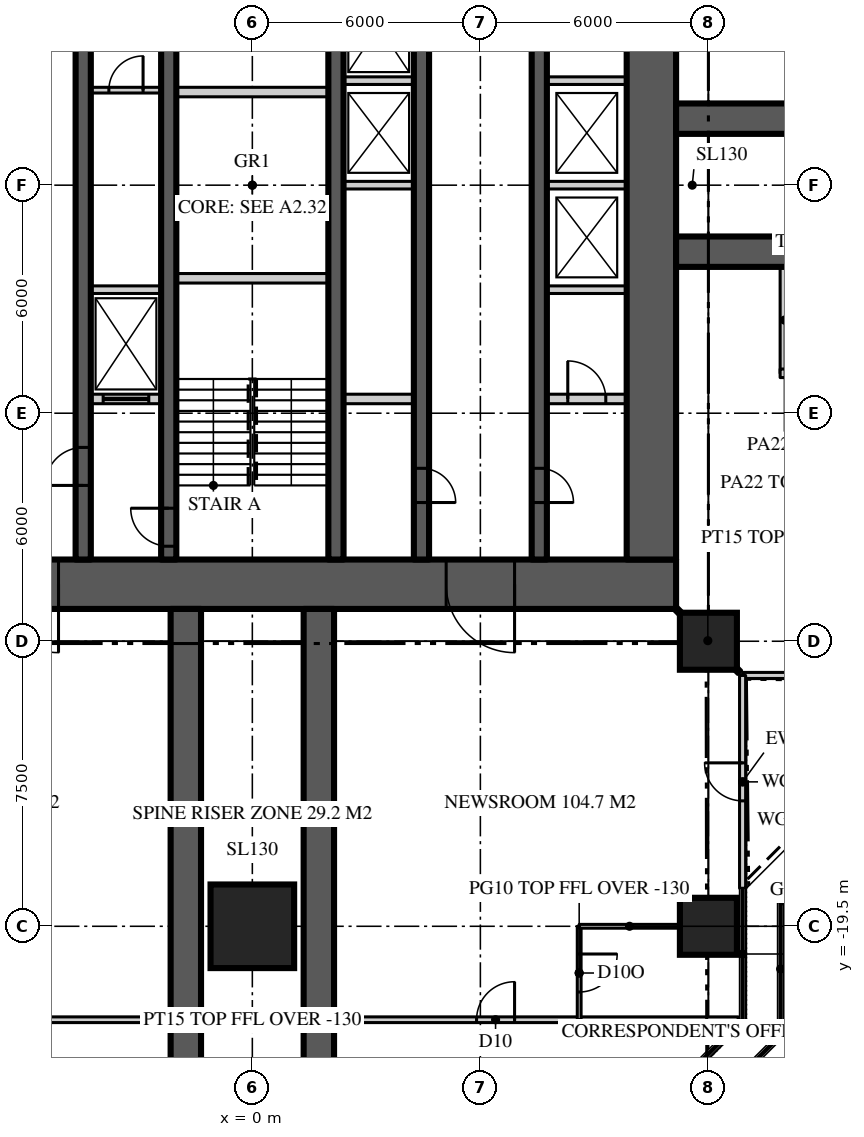
"""IFC4 building model, lengths in metres.
Left out: names, types, materials, properties, quantities, classifications, styles, units other than length and angle.
Written with IfcOpenShell. Run it as: python <this file> out.ifc"""

import sys

from ifc_helpers import new_model, si_unit, direction, frame, frame_2d, origin, origin_2d, place, context, subcontext, project, spatial, rectangle, extrude, element, fill, save


model = new_model("IFC4")
c1 = context("Model", 3, precision=1e-05, world=origin(), true_north=direction((0.0, 1.0)))
c2 = subcontext(c1, "Body", "Model", "MODEL_VIEW")
j1 = project(units=[si_unit("LENGTHUNIT", "METRE"), si_unit("PLANEANGLEUNIT", "RADIAN")], contexts=[c1])
p1 = place(None, origin())
s1 = spatial("IfcSite", under=j1, at=p1, CompositionType="ELEMENT")
p2 = place(p1, origin())
s2 = spatial("IfcBuilding", under=s1, at=p2, CompositionType="ELEMENT")
p3 = place(p2, frame((0.0, 0.0, 243.9)))
s3 = spatial("IfcBuildingStorey", under=s2, at=p3, CompositionType="ELEMENT", Elevation=243.9)
p4 = place(p3, frame((11.15, -10.5, 0.0), z_axis=(0.0, 0.0, 1.0), x_axis=(-1.0, 0.0, 0.0)))
e1 = element("IfcWall", 1, at=p4, inside=s3, PredefinedType="SHEAR", context=c2, shape_type="SweptSolid", body=[
    extrude(rectangle(XDim=22.3, YDim=1.3, at=frame_2d((11.15, 0.0))), origin(), (0.0, 0.0, 1.0), 3.9),
])
p5 = place(p4, frame((16.25, 0.0, 0.0)))
e2 = element("IfcOpeningElement", 2, at=p5, cuts=e1, PredefinedType="OPENING", context=c2, shape_type="SweptSolid", body=[
    extrude(rectangle(XDim=1.8, YDim=2.2, at=frame_2d((0.9, 1.1))), frame((0.0, 0.66, 0.0), z_axis=(0.0, -1.0, 0.0), x_axis=(1.0, 0.0, 0.0)), (0.0, 0.0, 1.0), 1.32),
])
p6 = place(p4, frame((4.25, 0.0, 0.0)))
e3 = element("IfcOpeningElement", 3, at=p6, cuts=e1, PredefinedType="OPENING", context=c2, shape_type="SweptSolid", body=[
    extrude(rectangle(XDim=1.8, YDim=2.2, at=frame_2d((0.9, 1.1))), frame((0.0, 0.66, 0.0), z_axis=(0.0, -1.0, 0.0), x_axis=(1.0, 0.0, 0.0)), (0.0, 0.0, 1.0), 1.32),
])
p7 = place(p3, frame((10.5, -9.85, 0.0), z_axis=(0.0, 0.0, 1.0), x_axis=(0.0, 1.0, 0.0)))
e4 = element("IfcWall", 4, at=p7, inside=s3, PredefinedType="SHEAR", context=c2, shape_type="SweptSolid", body=[
    extrude(rectangle(XDim=19.7, YDim=1.3, at=frame_2d((9.85, 0.0))), origin(), (0.0, 0.0, 1.0), 3.9),
])
p8 = place(p7, frame((17.25, 0.0, 0.0)))
e5 = element("IfcOpeningElement", 5, at=p8, cuts=e4, PredefinedType="OPENING", context=c2, shape_type="SweptSolid", body=[
    extrude(rectangle(XDim=1.0, YDim=2.2, at=frame_2d((0.5, 1.1))), frame((0.0, 0.66, 0.0), z_axis=(0.0, -1.0, 0.0), x_axis=(1.0, 0.0, 0.0)), (0.0, 0.0, 1.0), 1.32),
])
for number, where, z_axis, x_axis in (
    (6, (11.15, -1.75, 0.0), (0.0, 0.0, 1.0), (1.0, 0.0, 0.0)),
    (7, (11.15, 1.75, 0.0), (0.0, 0.0, 1.0), (1.0, 0.0, 0.0)),
    (8, (-1.75, -11.15, 0.0), (0.0, 0.0, 1.0), (0.0, -1.0, 0.0)),
    (9, (1.75, -11.15, 0.0), (0.0, 0.0, 1.0), (0.0, -1.0, 0.0)),
):
    element("IfcWall", number, at=place(p3, frame(where, z_axis=z_axis, x_axis=x_axis)), inside=s3, PredefinedType="SHEAR", context=c2, shape_type="SweptSolid", body=[
        extrude(rectangle(XDim=15.25, YDim=0.8, at=frame_2d((7.625, 0.0))), origin(), (0.0, 0.0, 1.0), 3.9),
    ])
p9 = place(p3, frame((0.0, -19.5, 0.0), z_axis=(0.0, 0.0, 1.0), x_axis=(1.0, 0.0, 0.0)))
e10 = element("IfcColumn", 10, at=p9, inside=s3, PredefinedType="COLUMN", context=c2, shape_type="SweptSolid", body=[
    extrude(rectangle(XDim=2.2, YDim=2.2, at=origin_2d()), origin(), (0.0, 0.0, 1.0), 3.9),
])
for number, where, z_axis, x_axis in (
    (11, (12.0, -19.5, 0.0), (0.0, 0.0, 1.0), (1.0, 0.0, 0.0)),
    (12, (12.0, -12.0, 0.0), (0.0, 0.0, 1.0), (1.0, 0.0, 0.0)),
):
    element("IfcColumn", number, at=place(p3, frame(where, z_axis=z_axis, x_axis=x_axis)), inside=s3, PredefinedType="COLUMN", context=c2, shape_type="SweptSolid", body=[
        extrude(rectangle(XDim=1.5, YDim=1.5, at=origin_2d()), origin(), (0.0, 0.0, 1.0), 3.9),
    ])
p10 = place(p3, frame((12.9, -12.9, 0.0), z_axis=(0.0, 0.0, 1.0), x_axis=(1.0, 0.0, 0.0)))
e13 = element("IfcWall", 13, at=p10, inside=s3, PredefinedType="SOLIDWALL", context=c2, shape_type="SweptSolid", body=[
    extrude(rectangle(XDim=5.6, YDim=0.16, at=frame_2d((2.8, 0.0))), origin(), (0.0, 0.0, 1.0), 3.77),
])
p11 = place(p3, frame((12.9, -18.5, 0.0), z_axis=(0.0, 0.0, 1.0), x_axis=(0.0, 1.0, 0.0)))
e14 = element("IfcWall", 14, at=p11, inside=s3, PredefinedType="SOLIDWALL", context=c2, shape_type="SweptSolid", body=[
    extrude(rectangle(XDim=5.6, YDim=0.16, at=frame_2d((2.8, 0.0))), origin(), (0.0, 0.0, 1.0), 3.77),
])
p12 = place(p11, frame((2.3, 0.0, 0.0)))
e15 = element("IfcOpeningElement", 15, at=p12, cuts=e14, PredefinedType="OPENING", context=c2, shape_type="SweptSolid", body=[
    extrude(rectangle(XDim=1.0, YDim=2.2, at=frame_2d((0.5, 1.1))), frame((0.0, 0.09, 0.0), z_axis=(0.0, -1.0, 0.0), x_axis=(1.0, 0.0, 0.0)), (0.0, 0.0, 1.0), 0.18),
])
p13 = place(p3, frame((7.55, 9.85, 0.0), z_axis=(0.0, 0.0, 1.0), x_axis=(0.0, -1.0, 0.0)))
e16 = element("IfcWall", 16, at=p13, inside=s3, PredefinedType="SHEAR", context=c2, shape_type="SweptSolid", body=[
    extrude(rectangle(XDim=19.7, YDim=0.4, at=frame_2d((9.85, 0.0))), origin(), (0.0, 0.0, 1.0), 3.9),
])
p14 = place(p13, frame((1.45, 0.0, 0.0)))
e17 = element("IfcOpeningElement", 17, at=p14, cuts=e16, PredefinedType="OPENING", context=c2, shape_type="SweptSolid", body=[
    extrude(rectangle(XDim=1.0, YDim=2.2, at=frame_2d((0.5, 1.1))), frame((0.0, 0.21, 0.0), z_axis=(0.0, -1.0, 0.0), x_axis=(1.0, 0.0, 0.0)), (0.0, 0.0, 1.0), 0.42),
])
p15 = place(p13, frame((17.3, 0.0, 0.0)))
e18 = element("IfcOpeningElement", 18, at=p15, cuts=e16, PredefinedType="OPENING", context=c2, shape_type="SweptSolid", body=[
    extrude(rectangle(XDim=0.9, YDim=2.1, at=frame_2d((0.45, 1.05))), frame((0.0, 0.21, 0.0), z_axis=(0.0, -1.0, 0.0), x_axis=(1.0, 0.0, 0.0)), (0.0, 0.0, 1.0), 0.42),
])
p16 = place(p3, frame((-4.45, -9.85, 0.0), z_axis=(0.0, 0.0, 1.0), x_axis=(0.0, 1.0, 0.0)))
e19 = element("IfcWall", 19, at=p16, inside=s3, PredefinedType="SHEAR", context=c2, shape_type="SweptSolid", body=[
    extrude(rectangle(XDim=19.7, YDim=0.4, at=frame_2d((9.85, 0.0))), origin(), (0.0, 0.0, 1.0), 3.9),
])
p17 = place(p16, frame((1.95, 0.0, 0.0)))
e20 = element("IfcOpeningElement", 20, at=p17, cuts=e19, PredefinedType="OPENING", context=c2, shape_type="SweptSolid", body=[
    extrude(rectangle(XDim=1.0, YDim=2.2, at=frame_2d((0.5, 1.1))), frame((0.0, 0.21, 0.0), z_axis=(0.0, -1.0, 0.0), x_axis=(1.0, 0.0, 0.0)), (0.0, 0.0, 1.0), 0.42),
])
p18 = place(p16, frame((17.25, 0.0, 0.0)))
e21 = element("IfcOpeningElement", 21, at=p18, cuts=e19, PredefinedType="OPENING", context=c2, shape_type="SweptSolid", body=[
    extrude(rectangle(XDim=1.0, YDim=2.1, at=frame_2d((0.5, 1.05))), frame((0.0, 0.21, 0.0), z_axis=(0.0, -1.0, 0.0), x_axis=(1.0, 0.0, 0.0)), (0.0, 0.0, 1.0), 0.42),
])
p19 = place(p3, frame((4.45, 9.85, 0.0), z_axis=(0.0, 0.0, 1.0), x_axis=(0.0, -1.0, 0.0)))
e22 = element("IfcWall", 22, at=p19, inside=s3, PredefinedType="SHEAR", context=c2, shape_type="SweptSolid", body=[
    extrude(rectangle(XDim=19.7, YDim=0.4, at=frame_2d((9.85, 0.0))), origin(), (0.0, 0.0, 1.0), 3.9),
])
p20 = place(p19, frame((1.95, 0.0, 0.0)))
e23 = element("IfcOpeningElement", 23, at=p20, cuts=e22, PredefinedType="OPENING", context=c2, shape_type="SweptSolid", body=[
    extrude(rectangle(XDim=1.0, YDim=2.2, at=frame_2d((0.5, 1.1))), frame((0.0, 0.21, 0.0), z_axis=(0.0, -1.0, 0.0), x_axis=(1.0, 0.0, 0.0)), (0.0, 0.0, 1.0), 0.42),
])
p21 = place(p19, frame((17.3, 0.0, 0.0)))
e24 = element("IfcOpeningElement", 24, at=p21, cuts=e22, PredefinedType="OPENING", context=c2, shape_type="SweptSolid", body=[
    extrude(rectangle(XDim=0.9, YDim=2.1, at=frame_2d((0.45, 1.05))), frame((0.0, 0.21, 0.0), z_axis=(0.0, -1.0, 0.0), x_axis=(1.0, 0.0, 0.0)), (0.0, 0.0, 1.0), 0.42),
])
p22 = place(p3, frame((-2.2, -9.85, 0.0), z_axis=(0.0, 0.0, 1.0), x_axis=(0.0, 1.0, 0.0)))
e25 = element("IfcWall", 25, at=p22, inside=s3, PredefinedType="SHEAR", context=c2, shape_type="SweptSolid", body=[
    extrude(rectangle(XDim=19.7, YDim=0.4, at=frame_2d((9.85, 0.0))), origin(), (0.0, 0.0, 1.0), 3.9),
])
p23 = place(p22, frame((0.35, 0.0, 0.0)))
e26 = element("IfcOpeningElement", 26, at=p23, cuts=e25, PredefinedType="OPENING", context=c2, shape_type="SweptSolid", body=[
    extrude(rectangle(XDim=1.0, YDim=2.2, at=frame_2d((0.5, 1.1))), frame((0.0, 0.21, 0.0), z_axis=(0.0, -1.0, 0.0), x_axis=(1.0, 0.0, 0.0)), (0.0, 0.0, 1.0), 0.42),
])
p24 = place(p3, frame((2.2, 9.85, 0.0), z_axis=(0.0, 0.0, 1.0), x_axis=(0.0, -1.0, 0.0)))
e27 = element("IfcWall", 27, at=p24, inside=s3, PredefinedType="SHEAR", context=c2, shape_type="SweptSolid", body=[
    extrude(rectangle(XDim=19.7, YDim=0.4, at=frame_2d((9.85, 0.0))), origin(), (0.0, 0.0, 1.0), 3.9),
])
p25 = place(p24, frame((0.35, 0.0, 0.0)))
e28 = element("IfcOpeningElement", 28, at=p25, cuts=e27, PredefinedType="OPENING", context=c2, shape_type="SweptSolid", body=[
    extrude(rectangle(XDim=1.0, YDim=2.2, at=frame_2d((0.5, 1.1))), frame((0.0, 0.21, 0.0), z_axis=(0.0, -1.0, 0.0), x_axis=(1.0, 0.0, 0.0)), (0.0, 0.0, 1.0), 0.42),
])
p26 = place(p3, frame((-4.25, -5.625, 0.0), z_axis=(0.0, 0.0, 1.0), x_axis=(1.0, 0.0, 0.0)))
e29 = element("IfcWall", 29, at=p26, inside=s3, PredefinedType="SOLIDWALL", context=c2, shape_type="SweptSolid", body=[
    extrude(rectangle(XDim=1.85, YDim=0.25, at=frame_2d((0.925, 0.0))), origin(), (0.0, 0.0, 1.0), 3.7),
])
p27 = place(p26, frame((0.325, 0.0, 0.0)))
e30 = element("IfcOpeningElement", 30, at=p27, cuts=e29, PredefinedType="OPENING", context=c2, shape_type="SweptSolid", body=[
    extrude(rectangle(XDim=1.2, YDim=2.2, at=frame_2d((0.6, 1.1))), frame((0.0, 0.135, 0.0), z_axis=(0.0, -1.0, 0.0), x_axis=(1.0, 0.0, 0.0)), (0.0, 0.0, 1.0), 0.27),
])
p28 = place(p3, frame((2.4, -5.625, 0.0), z_axis=(0.0, 0.0, 1.0), x_axis=(1.0, 0.0, 0.0)))
e31 = element("IfcWall", 31, at=p28, inside=s3, PredefinedType="SOLIDWALL", context=c2, shape_type="SweptSolid", body=[
    extrude(rectangle(XDim=1.85, YDim=0.25, at=frame_2d((0.925, 0.0))), origin(), (0.0, 0.0, 1.0), 3.7),
])
p29 = place(p3, frame((7.75, -5.625, 0.0), z_axis=(0.0, 0.0, 1.0), x_axis=(1.0, 0.0, 0.0)))
e32 = element("IfcWall", 32, at=p29, inside=s3, PredefinedType="SOLIDWALL", context=c2, shape_type="SweptSolid", body=[
    extrude(rectangle(XDim=2.1, YDim=0.25, at=frame_2d((1.05, 0.0))), origin(), (0.0, 0.0, 1.0), 3.7),
])
p30 = place(p29, frame((0.55, 0.0, 0.0)))
e33 = element("IfcOpeningElement", 33, at=p30, cuts=e32, PredefinedType="OPENING", context=c2, shape_type="SweptSolid", body=[
    extrude(rectangle(XDim=1.0, YDim=2.2, at=frame_2d((0.5, 1.1))), frame((0.0, 0.135, 0.0), z_axis=(0.0, -1.0, 0.0), x_axis=(1.0, 0.0, 0.0)), (0.0, 0.0, 1.0), 0.27),
])
for number, where, z_axis, x_axis in (
    (34, (-2.0, -2.45, 0.0), (0.0, 0.0, 1.0), (1.0, 0.0, 0.0)),
    (35, (-2.0, 2.45, 0.0), (0.0, 0.0, 1.0), (1.0, 0.0, 0.0)),
):
    element("IfcWall", number, at=place(p3, frame(where, z_axis=z_axis, x_axis=x_axis)), inside=s3, PredefinedType="SOLIDWALL", context=c2, shape_type="SweptSolid", body=[
        extrude(rectangle(XDim=4.0, YDim=0.25, at=frame_2d((2.0, 0.0))), origin(), (0.0, 0.0, 1.0), 3.7),
    ])
p31 = place(p3, frame((-4.25, -2.75, 0.0), z_axis=(0.0, 0.0, 1.0), x_axis=(1.0, 0.0, 0.0)))
e36 = element("IfcWall", 36, at=p31, inside=s3, PredefinedType="SOLIDWALL", context=c2, shape_type="SweptSolid", body=[
    extrude(rectangle(XDim=1.85, YDim=0.2, at=frame_2d((0.925, 0.0))), origin(), (0.0, 0.0, 1.0), 3.7),
])
p32 = place(p3, frame((7.75, -2.75, 0.0), z_axis=(0.0, 0.0, 1.0), x_axis=(1.0, 0.0, 0.0)))
e37 = element("IfcWall", 37, at=p32, inside=s3, PredefinedType="SOLIDWALL", context=c2, shape_type="SweptSolid", body=[
    extrude(rectangle(XDim=2.1, YDim=0.2, at=frame_2d((1.05, 0.0))), origin(), (0.0, 0.0, 1.0), 3.7),
])
p33 = place(p3, frame((2.4, 0.0, 0.0), z_axis=(0.0, 0.0, 1.0), x_axis=(1.0, 0.0, 0.0)))
e38 = element("IfcWall", 38, at=p33, inside=s3, PredefinedType="SOLIDWALL", context=c2, shape_type="SweptSolid", body=[
    extrude(rectangle(XDim=1.85, YDim=0.2, at=frame_2d((0.925, 0.0))), origin(), (0.0, 0.0, 1.0), 3.7),
])
p34 = place(p3, frame((7.75, 0.0, 0.0), z_axis=(0.0, 0.0, 1.0), x_axis=(1.0, 0.0, 0.0)))
e39 = element("IfcWall", 39, at=p34, inside=s3, PredefinedType="SOLIDWALL", context=c2, shape_type="SweptSolid", body=[
    extrude(rectangle(XDim=2.1, YDim=0.2, at=frame_2d((1.05, 0.0))), origin(), (0.0, 0.0, 1.0), 3.7),
])
p35 = place(p3, frame((2.4, 2.75, 0.0), z_axis=(0.0, 0.0, 1.0), x_axis=(1.0, 0.0, 0.0)))
e40 = element("IfcWall", 40, at=p35, inside=s3, PredefinedType="SOLIDWALL", context=c2, shape_type="SweptSolid", body=[
    extrude(rectangle(XDim=1.85, YDim=0.2, at=frame_2d((0.925, 0.0))), origin(), (0.0, 0.0, 1.0), 3.7),
])
p36 = place(p3, frame((7.75, 2.75, 0.0), z_axis=(0.0, 0.0, 1.0), x_axis=(1.0, 0.0, 0.0)))
e41 = element("IfcWall", 41, at=p36, inside=s3, PredefinedType="SOLIDWALL", context=c2, shape_type="SweptSolid", body=[
    extrude(rectangle(XDim=2.1, YDim=0.2, at=frame_2d((1.05, 0.0))), origin(), (0.0, 0.0, 1.0), 3.7),
])
p37 = place(p3, frame((14.0, -2.15, 0.0), z_axis=(0.0, 0.0, 1.0), x_axis=(0.0, -1.0, 0.0)))
e42 = element("IfcWall", 42, at=p37, inside=s3, PredefinedType="PARTITIONING", context=c2, shape_type="SweptSolid", body=[
    extrude(rectangle(XDim=2.8, YDim=0.225, at=frame_2d((1.4, 0.0))), origin(), (0.0, 0.0, 1.0), 3.18),
])
p38 = place(p3, frame((13.887, -4.95, 0.0), z_axis=(0.0, 0.0, 1.0), x_axis=(1.0, 0.0, 0.0)))
e43 = element("IfcWall", 43, at=p38, inside=s3, PredefinedType="PARTITIONING", context=c2, shape_type="SweptSolid", body=[
    extrude(rectangle(XDim=2.625, YDim=0.225, at=frame_2d((1.312, 0.0))), origin(), (0.0, 0.0, 1.0), 3.77),
])
p39 = place(p38, frame((0.712, 0.0, 0.0)))
e44 = element("IfcOpeningElement", 44, at=p39, cuts=e43, PredefinedType="OPENING", context=c2, shape_type="SweptSolid", body=[
    extrude(rectangle(XDim=1.2, YDim=2.2, at=frame_2d((0.6, 1.1))), frame((0.0, 0.123, 0.0), z_axis=(0.0, -1.0, 0.0), x_axis=(1.0, 0.0, 0.0)), (0.0, 0.0, 1.0), 0.245),
])
p40 = place(p3, frame((-12.786, -21.959, 0.0), z_axis=(0.0, 0.0, 1.0), x_axis=(1.0, 0.0, 0.0)))
e45 = element("IfcWall", 45, at=p40, inside=s3, PredefinedType="PARTITIONING", context=c2, shape_type="SweptSolid", body=[
    extrude(rectangle(XDim=25.573, YDim=0.15, at=frame_2d((12.786, 0.0))), origin(), (0.0, 0.0, 1.0), 3.77),
])
p41 = place(p40, frame((18.687, 0.0, 0.0)))
e46 = element("IfcOpeningElement", 46, at=p41, cuts=e45, PredefinedType="OPENING", context=c2, shape_type="SweptSolid", body=[
    extrude(rectangle(XDim=1.0, YDim=2.2, at=frame_2d((0.5, 1.1))), frame((0.0, 0.085, 0.0), z_axis=(0.0, -1.0, 0.0), x_axis=(1.0, 0.0, 0.0)), (0.0, 0.0, 1.0), 0.17),
])
p42 = place(p40, frame((5.886, 0.0, 0.0)))
e47 = element("IfcOpeningElement", 47, at=p42, cuts=e45, PredefinedType="OPENING", context=c2, shape_type="SweptSolid", body=[
    extrude(rectangle(XDim=1.0, YDim=2.2, at=frame_2d((0.5, 1.1))), frame((0.0, 0.085, 0.0), z_axis=(0.0, -1.0, 0.0), x_axis=(1.0, 0.0, 0.0)), (0.0, 0.0, 1.0), 0.17),
])
p43 = place(p3, frame((8.6, -19.5, 0.0), z_axis=(0.0, 0.0, 1.0), x_axis=(0.0, -1.0, 0.0)))
e48 = element("IfcWall", 48, at=p43, inside=s3, PredefinedType="PARTITIONING", context=c2, shape_type="SweptSolid", body=[
    extrude(rectangle(XDim=2.459, YDim=0.1, at=frame_2d((1.229, 0.0))), origin(), (0.0, 0.0, 1.0), 3.77),
])
p44 = place(p43, frame((0.729, 0.0, 0.0)))
e49 = element("IfcOpeningElement", 49, at=p44, cuts=e48, PredefinedType="OPENING", context=c2, shape_type="SweptSolid", body=[
    extrude(rectangle(XDim=1.0, YDim=2.2, at=frame_2d((0.5, 1.1))), frame((0.0, 0.06, 0.0), z_axis=(0.0, -1.0, 0.0), x_axis=(1.0, 0.0, 0.0)), (0.0, 0.0, 1.0), 0.12),
])
p45 = place(p3, frame((8.6, -19.5, 0.0), z_axis=(0.0, 0.0, 1.0), x_axis=(1.0, 0.0, 0.0)))
e50 = element("IfcWall", 50, at=p45, inside=s3, PredefinedType="PARTITIONING", context=c2, shape_type="SweptSolid", body=[
    extrude(rectangle(XDim=2.65, YDim=0.1, at=frame_2d((1.325, 0.0))), origin(), (0.0, 0.0, 1.0), 2.77),
])
p46 = place(p3, frame((11.15, -11.15, 0.0), z_axis=(0.0, 0.0, 1.0), x_axis=(0.707106781187, -0.707106781187, 0.0)))
e51 = element("IfcWall", 51, at=p46, inside=s3, PredefinedType="PARTITIONING", context=c2, shape_type="SweptSolid", body=[
    extrude(rectangle(XDim=2.362, YDim=0.15, at=frame_2d((1.181, 0.0))), origin(), (0.0, 0.0, 1.0), 3.22),
])
p47 = place(p3, frame((-4.25, 2.5, 0.0), z_axis=(0.0, 0.0, 1.0), x_axis=(1.0, 0.0, 0.0)))
e52 = element("IfcWall", 52, at=p47, inside=s3, PredefinedType="SOLIDWALL", context=c2, shape_type="SweptSolid", body=[
    extrude(rectangle(XDim=1.85, YDim=0.15, at=frame_2d((0.925, 0.0))), origin(), (0.0, 0.0, 1.0), 3.77),
])
p48 = place(p47, frame((0.475, 0.0, 0.0)))
e53 = element("IfcOpeningElement", 53, at=p48, cuts=e52, PredefinedType="OPENING", context=c2, shape_type="SweptSolid", body=[
    extrude(rectangle(XDim=0.9, YDim=2.1, at=frame_2d((0.45, 1.05))), frame((0.0, 0.085, 0.0), z_axis=(0.0, -1.0, 0.0), x_axis=(1.0, 0.0, 0.0)), (0.0, 0.0, 1.0), 0.17),
])
p49 = place(p12, origin())
e54 = element("IfcDoor", 54, at=p49, inside=s3, OperationType="SINGLE_SWING_RIGHT", PredefinedType="DOOR", context=c2, shape_type="SweptSolid", body=[
    extrude(rectangle(XDim=1.0, YDim=2.2, at=frame_2d((0.5, 1.1))), frame((0.0, 0.025, 0.0), z_axis=(0.0, -1.0, 0.0), x_axis=(1.0, 0.0, 0.0)), (0.0, 0.0, 1.0), 0.05),
])
fill(e15, e54)
p50 = place(p5, origin())
e55 = element("IfcDoor", 55, at=p50, inside=s3, OperationType="DOUBLE_DOOR_DOUBLE_SWING", PredefinedType="DOOR", context=c2, shape_type="SweptSolid", body=[
    extrude(rectangle(XDim=1.8, YDim=2.2, at=frame_2d((0.9, 1.1))), frame((0.0, 0.025, 0.0), z_axis=(0.0, -1.0, 0.0), x_axis=(1.0, 0.0, 0.0)), (0.0, 0.0, 1.0), 0.05),
])
fill(e2, e55)
p51 = place(p6, origin())
e56 = element("IfcDoor", 56, at=p51, inside=s3, OperationType="DOUBLE_DOOR_DOUBLE_SWING", PredefinedType="DOOR", context=c2, shape_type="SweptSolid", body=[
    extrude(rectangle(XDim=1.8, YDim=2.2, at=frame_2d((0.9, 1.1))), frame((0.0, 0.025, 0.0), z_axis=(0.0, -1.0, 0.0), x_axis=(1.0, 0.0, 0.0)), (0.0, 0.0, 1.0), 0.05),
])
fill(e3, e56)
p52 = place(p17, origin())
e57 = element("IfcDoor", 57, at=p52, inside=s3, OperationType="SINGLE_SWING_LEFT", PredefinedType="DOOR", context=c2, shape_type="SweptSolid", body=[
    extrude(rectangle(XDim=1.0, YDim=2.2, at=frame_2d((0.5, 1.1))), frame((0.0, 0.025, 0.0), z_axis=(0.0, -1.0, 0.0), x_axis=(1.0, 0.0, 0.0)), (0.0, 0.0, 1.0), 0.05),
])
fill(e20, e57)
p53 = place(p23, origin())
e58 = element("IfcDoor", 58, at=p53, inside=s3, OperationType="SINGLE_SWING_RIGHT", PredefinedType="DOOR", context=c2, shape_type="SweptSolid", body=[
    extrude(rectangle(XDim=1.0, YDim=2.2, at=frame_2d((0.5, 1.1))), frame((0.0, 0.025, 0.0), z_axis=(0.0, -1.0, 0.0), x_axis=(1.0, 0.0, 0.0)), (0.0, 0.0, 1.0), 0.05),
])
fill(e26, e58)
p54 = place(p15, origin())
e59 = element("IfcDoor", 59, at=p54, inside=s3, OperationType="SINGLE_SWING_RIGHT", PredefinedType="DOOR", context=c2, shape_type="SweptSolid", body=[
    extrude(rectangle(XDim=0.9, YDim=2.1, at=frame_2d((0.45, 1.05))), frame((0.0, 0.025, 0.0), z_axis=(0.0, -1.0, 0.0), x_axis=(1.0, 0.0, 0.0)), (0.0, 0.0, 1.0), 0.05),
])
fill(e18, e59)
p55 = place(p21, origin())
e60 = element("IfcDoor", 60, at=p55, inside=s3, OperationType="SINGLE_SWING_RIGHT", PredefinedType="DOOR", context=c2, shape_type="SweptSolid", body=[
    extrude(rectangle(XDim=0.9, YDim=2.1, at=frame_2d((0.45, 1.05))), frame((0.0, 0.025, 0.0), z_axis=(0.0, -1.0, 0.0), x_axis=(1.0, 0.0, 0.0)), (0.0, 0.0, 1.0), 0.05),
])
fill(e24, e60)
p56 = place(p27, origin())
e61 = element("IfcDoor", 61, at=p56, inside=s3, OperationType="SLIDING_TO_LEFT", PredefinedType="DOOR", context=c2, shape_type="SweptSolid", body=[
    extrude(rectangle(XDim=1.2, YDim=2.2, at=frame_2d((0.6, 1.1))), frame((0.0, 0.025, 0.0), z_axis=(0.0, -1.0, 0.0), x_axis=(1.0, 0.0, 0.0)), (0.0, 0.0, 1.0), 0.05),
])
fill(e30, e61)
p57 = place(p41, origin())
e62 = element("IfcDoor", 62, at=p57, inside=s3, OperationType="SINGLE_SWING_RIGHT", PredefinedType="DOOR", context=c2, shape_type="SweptSolid", body=[
    extrude(rectangle(XDim=1.0, YDim=2.2, at=frame_2d((0.5, 1.1))), frame((0.0, 0.025, 0.0), z_axis=(0.0, -1.0, 0.0), x_axis=(1.0, 0.0, 0.0)), (0.0, 0.0, 1.0), 0.05),
])
fill(e46, e62)
p58 = place(p44, origin())
e63 = element("IfcDoor", 63, at=p58, inside=s3, OperationType="SINGLE_SWING_LEFT", PredefinedType="DOOR", context=c2, shape_type="SweptSolid", body=[
    extrude(rectangle(XDim=1.0, YDim=2.2, at=frame_2d((0.5, 1.1))), frame((0.0, 0.025, 0.0), z_axis=(0.0, -1.0, 0.0), x_axis=(1.0, 0.0, 0.0)), (0.0, 0.0, 1.0), 0.05),
])
fill(e49, e63)
p59 = place(p48, origin())
e64 = element("IfcDoor", 64, at=p59, inside=s3, OperationType="SINGLE_SWING_RIGHT", PredefinedType="DOOR", context=c2, shape_type="SweptSolid", body=[
    extrude(rectangle(XDim=0.9, YDim=2.1, at=frame_2d((0.45, 1.05))), frame((0.0, 0.025, 0.0), z_axis=(0.0, -1.0, 0.0), x_axis=(1.0, 0.0, 0.0)), (0.0, 0.0, 1.0), 0.05),
])
fill(e53, e64)
p60 = place(p30, origin())
e65 = element("IfcDoor", 65, at=p60, inside=s3, OperationType="SINGLE_SWING_LEFT", PredefinedType="DOOR", context=c2, shape_type="SweptSolid", body=[
    extrude(rectangle(XDim=1.0, YDim=2.2, at=frame_2d((0.5, 1.1))), frame((0.0, 0.025, 0.0), z_axis=(0.0, -1.0, 0.0), x_axis=(1.0, 0.0, 0.0)), (0.0, 0.0, 1.0), 0.05),
])
fill(e33, e65)
save(model, sys.argv[1])
